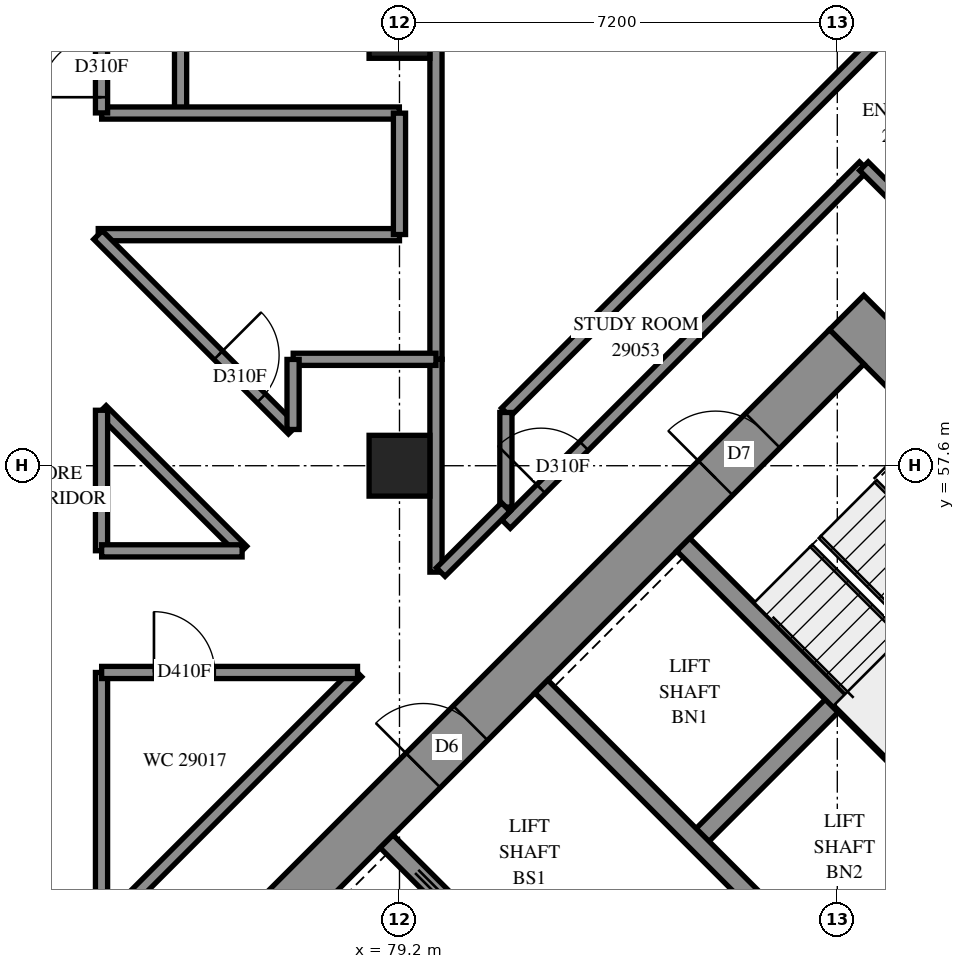
"""IFC4 building model, lengths in metres.
Left out: names, types, materials, properties, quantities, classifications, styles, units other than length and angle.
Written with IfcOpenShell. Run it as: python <this file> out.ifc"""

import sys

from ifc_helpers import new_model, si_unit, direction, frame, frame_2d, origin, origin_2d, place, context, subcontext, project, spatial, polyline, rectangle, outline, extrude, element, fill, save


model = new_model("IFC4")
c1 = context("Model", 3, precision=1e-05, world=origin(), true_north=direction((0.0, 1.0)))
c2 = subcontext(c1, "Body", "Model", "MODEL_VIEW")
j1 = project(units=[si_unit("LENGTHUNIT", "METRE"), si_unit("PLANEANGLEUNIT", "RADIAN")], contexts=[c1])
p1 = place(None, origin())
s1 = spatial("IfcSite", under=j1, at=p1, CompositionType="ELEMENT")
p2 = place(p1, origin())
s2 = spatial("IfcBuilding", under=s1, at=p2, CompositionType="ELEMENT")
p3 = place(p2, frame((0.0, 0.0, 108.4)))
s3 = spatial("IfcBuildingStorey", under=s2, at=p3, CompositionType="ELEMENT", Elevation=108.4)
for number, where, z_axis, x_axis in (
    (1, (79.2, 57.6, 0.0), (0.0, 0.0, 1.0), (1.0, 0.0, 0.0)),
    (2, (79.2, 64.8, 0.0), (0.0, 0.0, 1.0), (1.0, 0.0, 0.0)),
):
    element("IfcColumn", number, at=place(p3, frame(where, z_axis=z_axis, x_axis=x_axis)), inside=s3, PredefinedType="COLUMN", context=c2, shape_type="SweptSolid", body=[
        extrude(rectangle(XDim=1.0, YDim=1.0, at=origin_2d()), origin(), (0.0, 0.0, 1.0), 3.1),
    ])
p4 = place(p3, frame((86.554, 60.121, -0.3), z_axis=(0.0, 0.0, 1.0), x_axis=(0.7071067812, -0.7071067812, 0.0)))
e3 = element("IfcWall", 3, at=p4, inside=s3, PredefinedType="SHEAR", context=c2, shape_type="SweptSolid", body=[
    extrude(rectangle(XDim=16.0, YDim=0.8, at=frame_2d((8.0, 0.0))), origin(), (0.0, 0.0, 1.0), 2.7),
])
p5 = place(p4, frame((10.8, 0.0, 0.3)))
e4 = element("IfcOpeningElement", 4, at=p5, cuts=e3, PredefinedType="OPENING", context=c2, shape_type="SweptSolid", body=[
    extrude(rectangle(XDim=0.8, YDim=2.1, at=frame_2d((0.4, 1.05))), frame((0.0, 0.41, 0.0), z_axis=(0.0, -1.0, 0.0), x_axis=(1.0, 0.0, 0.0)), (0.0, 0.0, 1.0), 0.82),
])
p6 = place(p3, frame((76.372, 49.373, -0.3), z_axis=(0.0, 0.0, 1.0), x_axis=(0.7071067812, 0.7071067812, 0.0)))
e5 = element("IfcWall", 5, at=p6, inside=s3, PredefinedType="SHEAR", context=c2, shape_type="SweptSolid", body=[
    extrude(rectangle(XDim=14.4, YDim=0.8, at=frame_2d((7.2, 0.0))), origin(), (0.0, 0.0, 1.0), 2.7),
])
p7 = place(p6, frame((4.55, 0.0, 0.3)))
e6 = element("IfcOpeningElement", 6, at=p7, cuts=e5, PredefinedType="OPENING", context=c2, shape_type="SweptSolid", body=[
    extrude(rectangle(XDim=1.1, YDim=2.1, at=frame_2d((0.55, 1.05))), frame((0.0, 0.41, 0.0), z_axis=(0.0, -1.0, 0.0), x_axis=(1.0, 0.0, 0.0)), (0.0, 0.0, 1.0), 0.82),
])
p8 = place(p6, frame((11.35, 0.0, 0.3)))
e7 = element("IfcOpeningElement", 7, at=p8, cuts=e5, PredefinedType="OPENING", context=c2, shape_type="SweptSolid", body=[
    extrude(rectangle(XDim=1.1, YDim=2.1, at=frame_2d((0.55, 1.05))), frame((0.0, 0.41, 0.0), z_axis=(0.0, -1.0, 0.0), x_axis=(1.0, 0.0, 0.0)), (0.0, 0.0, 1.0), 0.82),
])
p9 = place(p3, frame((84.079, 51.423, 0.0), z_axis=(0.0, 0.0, 1.0), x_axis=(0.7071219326, 0.7070916295, 0.0)))
e8 = element("IfcWall", 8, at=p9, inside=s3, PredefinedType="SOLIDWALL", context=c2, shape_type="SweptSolid", body=[
    extrude(rectangle(XDim=3.3, YDim=0.3, at=frame_2d((1.65, 0.0))), origin(), (0.0, 0.0, 1.0), 3.1),
])
p10 = place(p3, frame((86.625, 48.878, 0.0), z_axis=(0.0, 0.0, 1.0), x_axis=(0.7071067812, 0.7071067812, 0.0)))
e9 = element("IfcWall", 9, at=p10, inside=s3, PredefinedType="SOLIDWALL", context=c2, shape_type="SweptSolid", body=[
    extrude(rectangle(XDim=3.3, YDim=0.3, at=frame_2d((1.65, 0.0))), origin(), (0.0, 0.0, 1.0), 3.1),
])
p11 = place(p3, frame((78.988, 51.423, 0.0), z_axis=(0.0, 0.0, 1.0), x_axis=(0.7071067812, -0.7071067812, 0.0)))
e10 = element("IfcWall", 10, at=p11, inside=s3, PredefinedType="SOLIDWALL", context=c2, shape_type="SweptSolid", body=[
    extrude(rectangle(XDim=14.4, YDim=0.3, at=frame_2d((7.2, 0.0))), origin(), (0.0, 0.0, 1.0), 3.1),
])
p12 = place(p11, frame((1.25, 0.0, 0.0)))
e11 = element("IfcOpeningElement", 11, at=p12, cuts=e10, PredefinedType="OPENING", context=c2, shape_type="SweptSolid", body=[
    extrude(rectangle(XDim=1.1, YDim=2.1, at=frame_2d((0.55, 1.05))), frame((0.0, 0.16, 0.0), z_axis=(0.0, -1.0, 0.0), x_axis=(1.0, 0.0, 0.0)), (0.0, 0.0, 1.0), 0.32),
])
p13 = place(p11, frame((4.85, 0.0, 0.0)))
e12 = element("IfcOpeningElement", 12, at=p13, cuts=e10, PredefinedType="OPENING", context=c2, shape_type="SweptSolid", body=[
    extrude(rectangle(XDim=1.1, YDim=2.1, at=frame_2d((0.55, 1.05))), frame((0.0, 0.16, 0.0), z_axis=(0.0, -1.0, 0.0), x_axis=(1.0, 0.0, 0.0)), (0.0, 0.0, 1.0), 0.32),
])
p14 = place(p11, frame((8.45, 0.0, 0.0)))
e13 = element("IfcOpeningElement", 13, at=p14, cuts=e10, PredefinedType="OPENING", context=c2, shape_type="SweptSolid", body=[
    extrude(rectangle(XDim=1.1, YDim=2.1, at=frame_2d((0.55, 1.05))), frame((0.0, 0.16, 0.0), z_axis=(0.0, -1.0, 0.0), x_axis=(1.0, 0.0, 0.0)), (0.0, 0.0, 1.0), 0.32),
])
p15 = place(p11, frame((12.05, 0.0, 0.0)))
e14 = element("IfcOpeningElement", 14, at=p15, cuts=e10, PredefinedType="OPENING", context=c2, shape_type="SweptSolid", body=[
    extrude(rectangle(XDim=1.1, YDim=2.1, at=frame_2d((0.55, 1.05))), frame((0.0, 0.16, 0.0), z_axis=(0.0, -1.0, 0.0), x_axis=(1.0, 0.0, 0.0)), (0.0, 0.0, 1.0), 0.32),
])
p16 = place(p3, frame((81.534, 53.969, 0.0), z_axis=(0.0, 0.0, 1.0), x_axis=(0.707103309, -0.7071102534, 0.0)))
e15 = element("IfcWall", 15, at=p16, inside=s3, PredefinedType="SOLIDWALL", context=c2, shape_type="SweptSolid", body=[
    extrude(rectangle(XDim=14.4, YDim=0.3, at=frame_2d((7.2, 0.0))), origin(), (0.0, 0.0, 1.0), 3.1),
])
p17 = place(p16, frame((12.05, 0.0, 0.0)))
e16 = element("IfcOpeningElement", 16, at=p17, cuts=e15, PredefinedType="OPENING", context=c2, shape_type="SweptSolid", body=[
    extrude(rectangle(XDim=1.1, YDim=2.1, at=frame_2d((0.55, 1.05))), frame((0.0, 0.16, 0.0), z_axis=(0.0, -1.0, 0.0), x_axis=(1.0, 0.0, 0.0)), (0.0, 0.0, 1.0), 0.32),
])
p18 = place(p3, frame((83.867, 56.302, 0.0), z_axis=(0.0, 0.0, 1.0), x_axis=(0.7071137256, -0.7070998367, 0.0)))
e17 = element("IfcWall", 17, at=p18, inside=s3, PredefinedType="SOLIDWALL", context=c2, shape_type="SweptSolid", body=[
    extrude(rectangle(XDim=7.2, YDim=0.3, at=frame_2d((3.6, 0.0))), origin(), (0.0, 0.0, 1.0), 3.1),
])
p19 = place(p3, frame((89.2, 64.07, 0.0), z_axis=(0.0, 0.0, 1.0), x_axis=(-0.8092802019, 0.5874228075, 0.0)))
e18 = element("IfcWall", 18, at=p19, inside=s3, PredefinedType="SOLIDWALL", context=c2, shape_type="SweptSolid", body=[
    extrude(outline(polyline([(-0.044, -0.275), (3.411, -0.275), (3.499, 0.275), (0.044, 0.275), (-0.044, -0.275)])), origin(), (0.0, 0.0, 1.0), 3.1),
])
p20 = place(p19, frame((0.473, 0.0, 0.5)))
e19 = element("IfcOpeningElement", 19, at=p20, cuts=e18, PredefinedType="OPENING", context=c2, shape_type="SweptSolid", body=[
    extrude(rectangle(XDim=1.2, YDim=2.45, at=frame_2d((0.6, 1.225))), frame((0.0, 0.285, 0.0), z_axis=(0.0, -1.0, 0.0), x_axis=(1.0, 0.0, 0.0)), (0.0, 0.0, 1.0), 0.57),
])
p21 = place(p3, frame((79.8, 59.35, 0.0), z_axis=(0.0, 0.0, 1.0), x_axis=(0.0, 1.0, 0.0)))
e20 = element("IfcWall", 20, at=p21, inside=s3, PredefinedType="PARTITIONING", context=c2, shape_type="SweptSolid", body=[
    extrude(rectangle(XDim=14.307, YDim=0.2, at=frame_2d((7.153, 0.0))), origin(), (0.0, 0.0, 1.0), 3.1),
])
p22 = place(p3, frame((75.6, 63.4, 0.0), z_axis=(0.0, 0.0, 1.0), x_axis=(0.0, 1.0, 0.0)))
e21 = element("IfcWall", 21, at=p22, inside=s3, PredefinedType="PARTITIONING", context=c2, shape_type="SweptSolid", body=[
    extrude(rectangle(XDim=9.353, YDim=0.2, at=frame_2d((4.676, 0.0))), origin(), (0.0, 0.0, 1.0), 3.1),
])
p23 = place(p3, frame((80.949, 58.477, 0.0), z_axis=(0.0, 0.0, 1.0), x_axis=(0.7071067812, 0.7071067812, 0.0)))
e22 = element("IfcWall", 22, at=p23, inside=s3, PredefinedType="PARTITIONING", context=c2, shape_type="SweptSolid", body=[
    extrude(rectangle(XDim=9.212, YDim=0.2, at=frame_2d((4.606, 0.0))), origin(), (0.0, 0.0, 1.0), 3.1),
])
p24 = place(p3, frame((80.951, 56.641, 0.0), z_axis=(0.0, 0.0, 1.0), x_axis=(0.7071067812, 0.7071067812, 0.0)))
e23 = element("IfcWall", 23, at=p24, inside=s3, PredefinedType="PARTITIONING", context=c2, shape_type="SweptSolid", body=[
    extrude(rectangle(XDim=8.321, YDim=0.2, at=frame_2d((4.161, 0.0))), origin(), (0.0, 0.0, 1.0), 3.1),
])
p25 = place(p24, frame((0.816, 0.0, 0.0)))
e24 = element("IfcOpeningElement", 24, at=p25, cuts=e23, PredefinedType="OPENING", context=c2, shape_type="SweptSolid", body=[
    extrude(rectangle(XDim=1.0, YDim=2.1, at=frame_2d((0.5, 1.05))), frame((0.0, 0.11, 0.0), z_axis=(0.0, -1.0, 0.0), x_axis=(1.0, 0.0, 0.0)), (0.0, 0.0, 1.0), 0.22),
])
p26 = place(p3, frame((74.301, 49.991, 0.0), z_axis=(0.0, 0.0, 1.0), x_axis=(0.7071067812, 0.7071067812, 0.0)))
e25 = element("IfcWall", 25, at=p26, inside=s3, PredefinedType="PARTITIONING", context=c2, shape_type="SweptSolid", body=[
    extrude(rectangle(XDim=5.951, YDim=0.2, at=frame_2d((2.975, 0.0))), origin(), (0.0, 0.0, 1.0), 3.1),
])
p27 = place(p3, frame((74.246, 61.4, 0.0), z_axis=(0.0, 0.0, 1.0), x_axis=(1.0, 0.0, 0.0)))
e26 = element("IfcWall", 26, at=p27, inside=s3, PredefinedType="PARTITIONING", context=c2, shape_type="SweptSolid", body=[
    extrude(rectangle(XDim=4.954, YDim=0.2, at=frame_2d((2.477, 0.0))), origin(), (0.0, 0.0, 1.0), 3.1),
])
p28 = place(p3, frame((74.302, 63.4, 0.0), z_axis=(0.0, 0.0, 1.0), x_axis=(1.0, 0.0, 0.0)))
e27 = element("IfcWall", 27, at=p28, inside=s3, PredefinedType="PARTITIONING", context=c2, shape_type="SweptSolid", body=[
    extrude(rectangle(XDim=4.896, YDim=0.2, at=frame_2d((2.448, 0.0))), origin(), (0.0, 0.0, 1.0), 3.1),
])
p29 = place(p3, frame((74.243, 61.395, 0.0), z_axis=(0.0, 0.0, 1.0), x_axis=(0.7071067812, -0.7071067812, 0.0)))
e28 = element("IfcWall", 28, at=p29, inside=s3, PredefinedType="PARTITIONING", context=c2, shape_type="SweptSolid", body=[
    extrude(rectangle(XDim=4.528, YDim=0.2, at=frame_2d((2.264, 0.0))), origin(), (0.0, 0.0, 1.0), 3.1),
])
p30 = place(p29, frame((2.797, 0.0, 0.0)))
e29 = element("IfcOpeningElement", 29, at=p30, cuts=e28, PredefinedType="OPENING", context=c2, shape_type="SweptSolid", body=[
    extrude(rectangle(XDim=1.0, YDim=2.1, at=frame_2d((0.5, 1.05))), frame((0.0, 0.11, 0.0), z_axis=(0.0, -1.0, 0.0), x_axis=(1.0, 0.0, 0.0)), (0.0, 0.0, 1.0), 0.22),
])
p31 = place(p3, frame((74.3, 49.99, 0.0), z_axis=(0.0, 0.0, 1.0), x_axis=(0.0, 1.0, 0.0)))
e30 = element("IfcWall", 30, at=p31, inside=s3, PredefinedType="PARTITIONING", context=c2, shape_type="SweptSolid", body=[
    extrude(rectangle(XDim=4.21, YDim=0.2, at=frame_2d((2.105, 0.0))), origin(), (0.0, 0.0, 1.0), 3.1),
])
p32 = place(p3, frame((74.302, 54.2, 0.0), z_axis=(0.0, 0.0, 1.0), x_axis=(1.0, 0.0, 0.0)))
e31 = element("IfcWall", 31, at=p32, inside=s3, PredefinedType="PARTITIONING", context=c2, shape_type="SweptSolid", body=[
    extrude(rectangle(XDim=4.208, YDim=0.2, at=frame_2d((2.104, 0.0))), origin(), (0.0, 0.0, 1.0), 3.1),
])
p33 = place(p32, frame((0.86, 0.0, 0.0)))
e32 = element("IfcOpeningElement", 32, at=p33, cuts=e31, PredefinedType="OPENING", context=c2, shape_type="SweptSolid", body=[
    extrude(rectangle(XDim=1.0, YDim=2.1, at=frame_2d((0.5, 1.05))), frame((0.0, 0.11, 0.0), z_axis=(0.0, -1.0, 0.0), x_axis=(1.0, 0.0, 0.0)), (0.0, 0.0, 1.0), 0.22),
])
p34 = place(p3, frame((74.3, 63.402, 0.0), z_axis=(0.0, 0.0, 1.0), x_axis=(0.0, 1.0, 0.0)))
e33 = element("IfcWall", 33, at=p34, inside=s3, PredefinedType="PARTITIONING", context=c2, shape_type="SweptSolid", body=[
    extrude(rectangle(XDim=3.698, YDim=0.2, at=frame_2d((1.849, 0.0))), origin(), (0.0, 0.0, 1.0), 3.1),
])
p35 = place(p34, frame((0.258, 0.0, 0.0)))
e34 = element("IfcOpeningElement", 34, at=p35, cuts=e33, PredefinedType="OPENING", context=c2, shape_type="SweptSolid", body=[
    extrude(rectangle(XDim=1.0, YDim=2.1, at=frame_2d((0.5, 1.05))), frame((0.0, 0.11, 0.0), z_axis=(0.0, -1.0, 0.0), x_axis=(1.0, 0.0, 0.0)), (0.0, 0.0, 1.0), 0.22),
])
p36 = place(p3, frame((79.8, 55.85, 0.0), z_axis=(0.0, 0.0, 1.0), x_axis=(0.0, 1.0, 0.0)))
e35 = element("IfcWall", 35, at=p36, inside=s3, PredefinedType="PARTITIONING", context=c2, shape_type="SweptSolid", body=[
    extrude(rectangle(XDim=3.5, YDim=0.2, at=frame_2d((1.75, 0.0))), origin(), (0.0, 0.0, 1.0), 3.1),
])
p37 = place(p3, frame((74.305, 58.517, 0.0), z_axis=(0.0, 0.0, 1.0), x_axis=(0.7071067812, -0.7071067812, 0.0)))
e36 = element("IfcWall", 36, at=p37, inside=s3, PredefinedType="PARTITIONING", context=c2, shape_type="SweptSolid", body=[
    extrude(rectangle(XDim=3.27, YDim=0.2, at=frame_2d((1.635, 0.0))), origin(), (0.0, 0.0, 1.0), 3.1),
])
p38 = place(p3, frame((77.452, 59.35, 0.0), z_axis=(0.0, 0.0, 1.0), x_axis=(1.0, 0.0, 0.0)))
e37 = element("IfcWall", 37, at=p38, inside=s3, PredefinedType="PARTITIONING", context=c2, shape_type="SweptSolid", body=[
    extrude(rectangle(XDim=2.348, YDim=0.2, at=frame_2d((1.174, 0.0))), origin(), (0.0, 0.0, 1.0), 3.1),
])
for number, where, z_axis, x_axis in (
    (38, (74.3, 56.202, 0.0), (0.0, 0.0, 1.0), (0.0, 1.0, 0.0)),
    (39, (74.302, 56.2, 0.0), (0.0, 0.0, 1.0), (1.0, 0.0, 0.0)),
):
    element("IfcWall", number, at=place(p3, frame(where, z_axis=z_axis, x_axis=x_axis)), inside=s3, PredefinedType="PARTITIONING", context=c2, shape_type="SweptSolid", body=[
        extrude(rectangle(XDim=2.31, YDim=0.2, at=frame_2d((1.155, 0.0))), origin(), (0.0, 0.0, 1.0), 3.1),
    ])
p39 = place(p3, frame((79.2, 61.402, 0.0), z_axis=(0.0, 0.0, 1.0), x_axis=(0.0, 1.0, 0.0)))
e40 = element("IfcWall", 40, at=p39, inside=s3, PredefinedType="PARTITIONING", context=c2, shape_type="SweptSolid", body=[
    extrude(rectangle(XDim=1.996, YDim=0.2, at=frame_2d((0.998, 0.0))), origin(), (0.0, 0.0, 1.0), 3.1),
])
p40 = place(p3, frame((80.95, 56.92, 0.0), z_axis=(0.0, 0.0, 1.0), x_axis=(0.0, 1.0, 0.0)))
e41 = element("IfcWall", 41, at=p40, inside=s3, PredefinedType="PARTITIONING", context=c2, shape_type="SweptSolid", body=[
    extrude(rectangle(XDim=1.556, YDim=0.2, at=frame_2d((0.778, 0.0))), origin(), (0.0, 0.0, 1.0), 3.1),
])
p41 = place(p3, frame((79.879, 55.851, 0.0), z_axis=(0.0, 0.0, 1.0), x_axis=(0.7071067812, 0.7071067812, 0.0)))
e42 = element("IfcWall", 42, at=p41, inside=s3, PredefinedType="PARTITIONING", context=c2, shape_type="SweptSolid", body=[
    extrude(rectangle(XDim=1.513, YDim=0.2, at=frame_2d((0.757, 0.0))), origin(), (0.0, 0.0, 1.0), 3.1),
])
p42 = place(p3, frame((86.838, 62.526, 0.0), z_axis=(0.0, 0.0, 1.0), x_axis=(0.70777292, -0.7064400143, 0.0)))
e43 = element("IfcWall", 43, at=p42, inside=s3, PredefinedType="PARTITIONING", context=c2, shape_type="SweptSolid", body=[
    extrude(rectangle(XDim=1.5, YDim=0.2, at=frame_2d((0.75, 0.0))), origin(), (0.0, 0.0, 1.0), 3.1),
])
p43 = place(p3, frame((77.45, 58.196, 0.0), z_axis=(0.0, 0.0, 1.0), x_axis=(0.0, 1.0, 0.0)))
e44 = element("IfcWall", 44, at=p43, inside=s3, PredefinedType="PARTITIONING", context=c2, shape_type="SweptSolid", body=[
    extrude(rectangle(XDim=1.152, YDim=0.2, at=frame_2d((0.576, 0.0))), origin(), (0.0, 0.0, 1.0), 3.1),
])
p44 = place(p7, origin())
e45 = element("IfcDoor", 45, at=p44, inside=s3, OperationType="DOUBLE_DOOR_SINGLE_SWING", PredefinedType="DOOR", context=c2, shape_type="SweptSolid", body=[
    extrude(rectangle(XDim=1.1, YDim=2.1, at=frame_2d((0.55, 1.05))), frame((0.0, 0.025, 0.0), z_axis=(0.0, -1.0, 0.0), x_axis=(1.0, 0.0, 0.0)), (0.0, 0.0, 1.0), 0.05),
])
fill(e6, e45)
p45 = place(p8, origin())
e46 = element("IfcDoor", 46, at=p45, inside=s3, OperationType="SINGLE_SWING_LEFT", PredefinedType="DOOR", context=c2, shape_type="SweptSolid", body=[
    extrude(rectangle(XDim=1.1, YDim=2.1, at=frame_2d((0.55, 1.05))), frame((0.0, 0.025, 0.0), z_axis=(0.0, -1.0, 0.0), x_axis=(1.0, 0.0, 0.0)), (0.0, 0.0, 1.0), 0.05),
])
fill(e7, e46)
p46 = place(p33, origin())
e47 = element("IfcDoor", 47, at=p46, inside=s3, OperationType="SINGLE_SWING_RIGHT", PredefinedType="DOOR", context=c2, shape_type="SweptSolid", body=[
    extrude(rectangle(XDim=1.0, YDim=2.1, at=frame_2d((0.5, 1.05))), frame((0.0, 0.025, 0.0), z_axis=(0.0, -1.0, 0.0), x_axis=(1.0, 0.0, 0.0)), (0.0, 0.0, 1.0), 0.05),
])
fill(e32, e47)
p47 = place(p35, origin())
e48 = element("IfcDoor", 48, at=p47, inside=s3, OperationType="SINGLE_SWING_RIGHT", PredefinedType="DOOR", context=c2, shape_type="SweptSolid", body=[
    extrude(rectangle(XDim=1.0, YDim=2.1, at=frame_2d((0.5, 1.05))), frame((0.0, 0.025, 0.0), z_axis=(0.0, -1.0, 0.0), x_axis=(1.0, 0.0, 0.0)), (0.0, 0.0, 1.0), 0.05),
])
fill(e34, e48)
p48 = place(p30, origin())
e49 = element("IfcDoor", 49, at=p48, inside=s3, OperationType="SINGLE_SWING_LEFT", PredefinedType="DOOR", context=c2, shape_type="SweptSolid", body=[
    extrude(rectangle(XDim=1.0, YDim=2.1, at=frame_2d((0.5, 1.05))), frame((0.0, 0.025, 0.0), z_axis=(0.0, -1.0, 0.0), x_axis=(1.0, 0.0, 0.0)), (0.0, 0.0, 1.0), 0.05),
])
fill(e29, e49)
p49 = place(p25, origin())
e50 = element("IfcDoor", 50, at=p49, inside=s3, OperationType="SINGLE_SWING_RIGHT", PredefinedType="DOOR", context=c2, shape_type="SweptSolid", body=[
    extrude(rectangle(XDim=1.0, YDim=2.1, at=frame_2d((0.5, 1.05))), frame((0.0, 0.025, 0.0), z_axis=(0.0, -1.0, 0.0), x_axis=(1.0, 0.0, 0.0)), (0.0, 0.0, 1.0), 0.05),
])
fill(e24, e50)
save(model, sys.argv[1])
